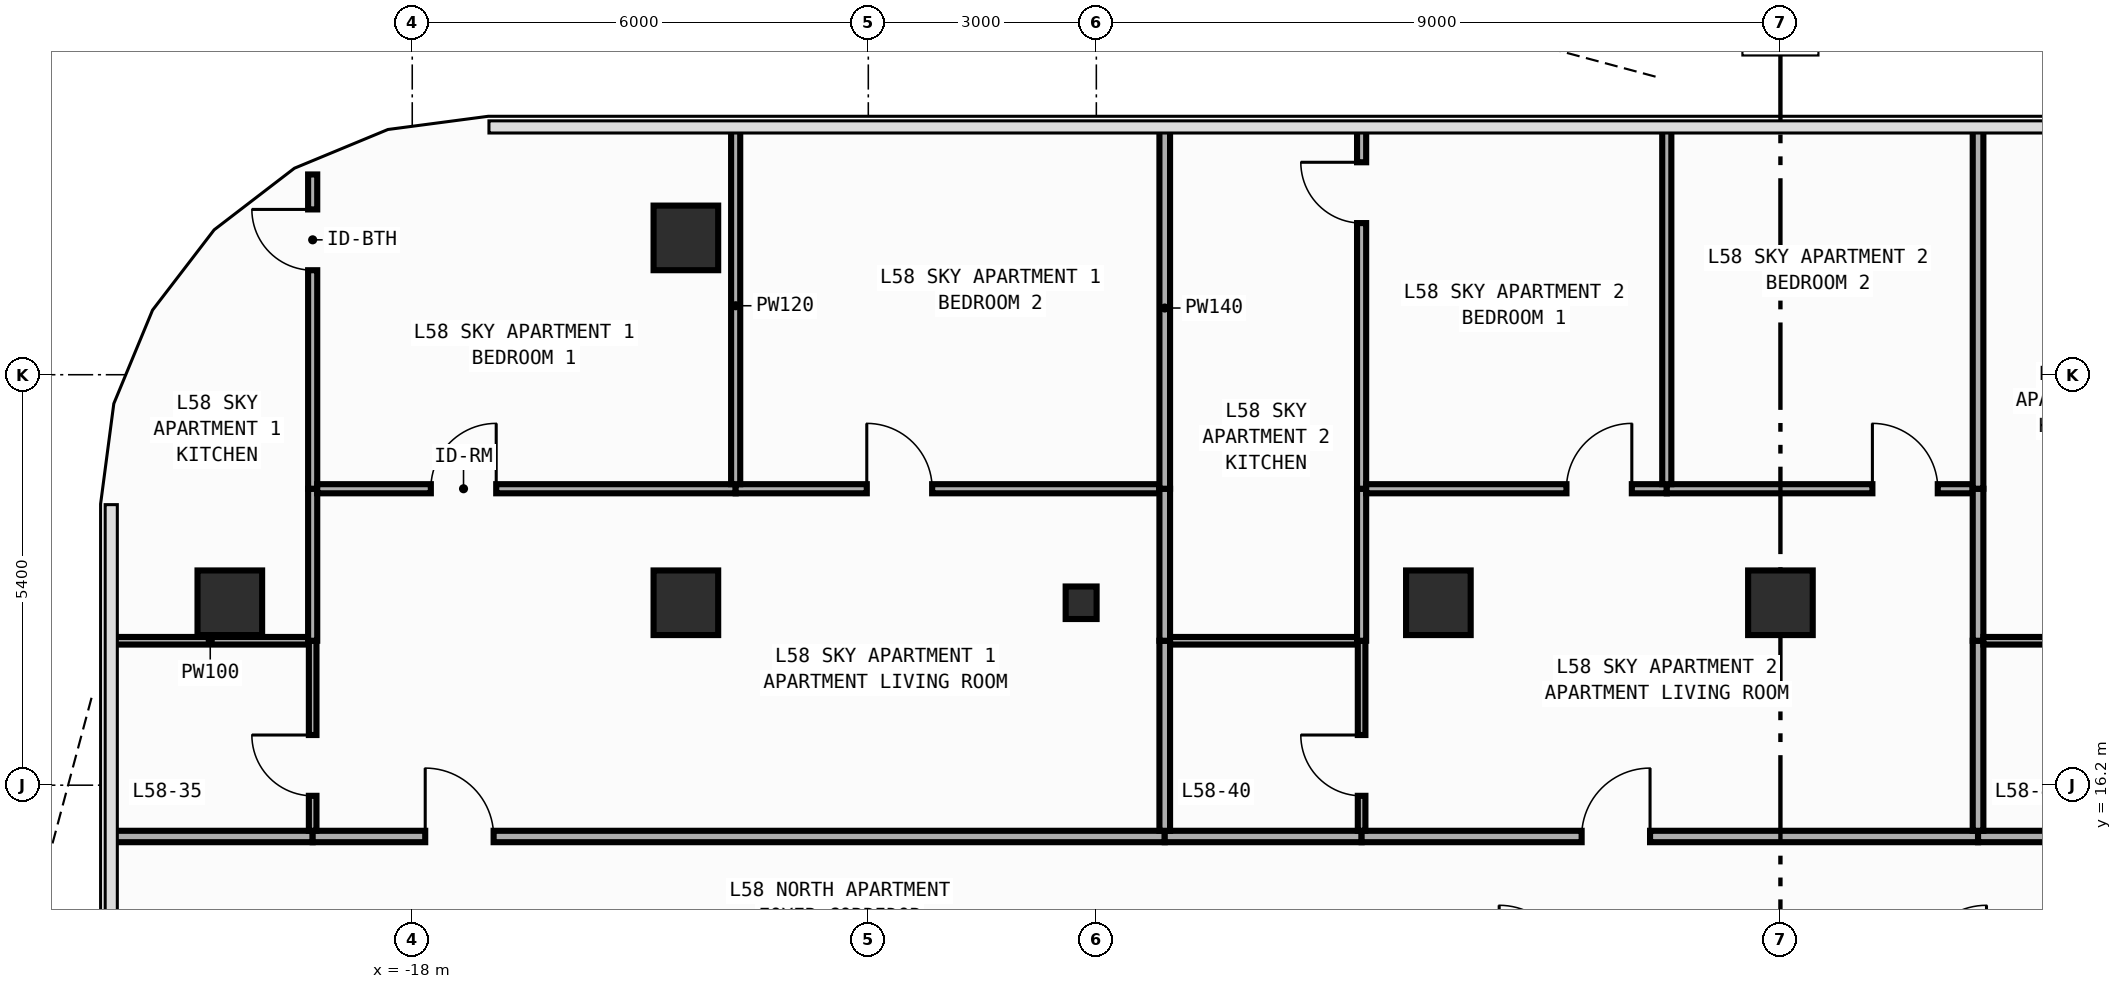
"""IFC4 building model, lengths in metres.
Left out: names, types, materials, properties, quantities, classifications, styles, units other than length and angle.
Written with IfcOpenShell. Run it as: python <this file> out.ifc"""

import sys

from ifc_helpers import new_model, si_unit, direction, frame, frame_2d, origin, origin_2d, place, context, subcontext, project, spatial, rectangle, i_section, extrude, element, fill, save


model = new_model("IFC4")
c1 = context("Model", 3, precision=1e-05, world=origin(), true_north=direction((0.0, 1.0)))
c2 = subcontext(c1, "Body", "Model", "MODEL_VIEW")
j1 = project(units=[si_unit("LENGTHUNIT", "METRE"), si_unit("PLANEANGLEUNIT", "RADIAN")], contexts=[c1])
p1 = place(None, origin())
s1 = spatial("IfcSite", under=j1, at=p1, CompositionType="ELEMENT")
p2 = place(p1, origin())
s2 = spatial("IfcBuilding", under=s1, at=p2, CompositionType="ELEMENT")
p3 = place(p2, frame((0.0, 0.0, 247.6)))
s3 = spatial("IfcBuildingStorey", under=s2, at=p3, CompositionType="ELEMENT", Elevation=247.6)
p4 = place(p3, frame((-9.2, 18.6, 0.0), z_axis=(0.0, 0.0, 1.0), x_axis=(1.0, 0.0, 0.0)))
e1 = element("IfcColumn", 1, at=p4, inside=s3, PredefinedType="COLUMN", context=c2, shape_type="SweptSolid", body=[
    extrude(i_section(OverallWidth=0.407, OverallDepth=0.428, WebThickness=0.02, FlangeThickness=0.035, FilletRadius=0.022, at=origin_2d()), origin(), (0.0, 0.0, 1.0), 3.6),
])
for number, where, z_axis, x_axis in (
    (2, (-20.4, 18.6, 0.0), (0.0, 0.0, 1.0), (1.0, 0.0, 0.0)),
    (3, (-14.4, 18.6, 0.0), (0.0, 0.0, 1.0), (1.0, 0.0, 0.0)),
    (4, (-4.5, 18.6, 0.0), (0.0, 0.0, 1.0), (1.0, 0.0, 0.0)),
    (5, (0.0, 18.6, 0.0), (0.0, 0.0, 1.0), (1.0, 0.0, 0.0)),
    (6, (-14.4, 23.4, 0.0), (0.0, 0.0, 1.0), (1.0, 0.0, 0.0)),
):
    element("IfcColumn", number, at=place(p3, frame(where, z_axis=z_axis, x_axis=x_axis)), inside=s3, PredefinedType="COLUMN", context=c2, shape_type="SweptSolid", body=[
        extrude(rectangle(XDim=0.85, YDim=0.85, at=origin_2d()), origin(), (0.0, 0.0, 1.0), 3.6),
    ])
p5 = place(p3, frame((-21.955, 15.525, 0.0), z_axis=(0.0, 0.0, 1.0), x_axis=(1.0, 0.0, 0.0)))
e7 = element("IfcWall", 7, at=p5, inside=s3, PredefinedType="PARTITIONING", context=c2, shape_type="SweptSolid", body=[
    extrude(rectangle(XDim=2.645, YDim=0.15, at=frame_2d((1.323, 0.0))), origin(), (0.0, 0.0, 1.0), 3.34),
])
p6 = place(p3, frame((-19.31, 15.525, 0.0), z_axis=(0.0, 0.0, 1.0), x_axis=(1.0, 0.0, 0.0)))
e8 = element("IfcWall", 8, at=p6, inside=s3, PredefinedType="PARTITIONING", context=c2, shape_type="SweptSolid", body=[
    extrude(rectangle(XDim=11.21, YDim=0.15, at=frame_2d((5.605, 0.0))), origin(), (0.0, 0.0, 1.0), 3.34),
])
p7 = place(p6, frame((1.481, 0.0, 0.0)))
e9 = element("IfcOpeningElement", 9, at=p7, cuts=e8, PredefinedType="OPENING", context=c2, shape_type="SweptSolid", body=[
    extrude(rectangle(XDim=0.9, YDim=2.15, at=frame_2d((0.45, 1.075))), frame((0.0, 0.085, 0.0), z_axis=(0.0, -1.0, 0.0), x_axis=(1.0, 0.0, 0.0)), (0.0, 0.0, 1.0), 0.17),
])
p8 = place(p3, frame((-8.1, 15.525, 0.0), z_axis=(0.0, 0.0, 1.0), x_axis=(1.0, 0.0, 0.0)))
e10 = element("IfcWall", 10, at=p8, inside=s3, PredefinedType="PARTITIONING", context=c2, shape_type="SweptSolid", body=[
    extrude(rectangle(XDim=2.59, YDim=0.15, at=frame_2d((1.295, 0.0))), origin(), (0.0, 0.0, 1.0), 3.34),
])
p9 = place(p3, frame((-5.51, 15.525, 0.0), z_axis=(0.0, 0.0, 1.0), x_axis=(1.0, 0.0, 0.0)))
e11 = element("IfcWall", 11, at=p9, inside=s3, PredefinedType="PARTITIONING", context=c2, shape_type="SweptSolid", body=[
    extrude(rectangle(XDim=8.11, YDim=0.15, at=frame_2d((4.055, 0.0))), origin(), (0.0, 0.0, 1.0), 3.34),
])
p10 = place(p9, frame((2.895, 0.0, 0.0)))
e12 = element("IfcOpeningElement", 12, at=p10, cuts=e11, PredefinedType="OPENING", context=c2, shape_type="SweptSolid", body=[
    extrude(rectangle(XDim=0.9, YDim=2.15, at=frame_2d((0.45, 1.075))), frame((0.0, 0.085, 0.0), z_axis=(0.0, -1.0, 0.0), x_axis=(1.0, 0.0, 0.0)), (0.0, 0.0, 1.0), 0.17),
])
p11 = place(p3, frame((2.6, 15.525, 0.0), z_axis=(0.0, 0.0, 1.0), x_axis=(1.0, 0.0, 0.0)))
e13 = element("IfcWall", 13, at=p11, inside=s3, PredefinedType="PARTITIONING", context=c2, shape_type="SweptSolid", body=[
    extrude(rectangle(XDim=2.59, YDim=0.15, at=frame_2d((1.295, 0.0))), origin(), (0.0, 0.0, 1.0), 3.34),
])
p12 = place(p3, frame((-21.955, 18.1, 0.0), z_axis=(0.0, 0.0, 1.0), x_axis=(1.0, 0.0, 0.0)))
e14 = element("IfcWall", 14, at=p12, inside=s3, PredefinedType="PARTITIONING", context=c2, shape_type="SweptSolid", body=[
    extrude(rectangle(XDim=2.595, YDim=0.1, at=frame_2d((1.297, 0.0))), origin(), (0.0, 0.0, 1.0), 3.34),
])
p13 = place(p3, frame((-19.31, 15.6, 0.0), z_axis=(0.0, 0.0, 1.0), x_axis=(0.0, 1.0, 0.0)))
e15 = element("IfcWall", 15, at=p13, inside=s3, PredefinedType="PARTITIONING", context=c2, shape_type="SweptSolid", body=[
    extrude(rectangle(XDim=2.5, YDim=0.1, at=frame_2d((1.25, 0.0))), origin(), (0.0, 0.0, 1.0), 3.34),
])
p14 = place(p13, frame((0.46, 0.0, 0.0)))
e16 = element("IfcOpeningElement", 16, at=p14, cuts=e15, PredefinedType="OPENING", context=c2, shape_type="SweptSolid", body=[
    extrude(rectangle(XDim=0.8, YDim=2.1, at=frame_2d((0.4, 1.05))), frame((0.0, 0.06, 0.0), z_axis=(0.0, -1.0, 0.0), x_axis=(1.0, 0.0, 0.0)), (0.0, 0.0, 1.0), 0.12),
])
p15 = place(p3, frame((-19.31, 18.1, 0.0), z_axis=(0.0, 0.0, 1.0), x_axis=(0.0, 1.0, 0.0)))
e17 = element("IfcWall", 17, at=p15, inside=s3, PredefinedType="PARTITIONING", context=c2, shape_type="SweptSolid", body=[
    extrude(rectangle(XDim=2.0, YDim=0.12, at=frame_2d((1.0, 0.0))), origin(), (0.0, 0.0, 1.0), 3.34),
])
p16 = place(p3, frame((-19.31, 20.1, 0.0), z_axis=(0.0, 0.0, 1.0), x_axis=(0.0, 1.0, 0.0)))
e18 = element("IfcWall", 18, at=p16, inside=s3, PredefinedType="PARTITIONING", context=c2, shape_type="SweptSolid", body=[
    extrude(rectangle(XDim=4.135, YDim=0.12, at=frame_2d((2.067, 0.0))), origin(), (0.0, 0.0, 1.0), 3.34),
])
p17 = place(p16, frame((2.875, 0.0, 0.0)))
e19 = element("IfcOpeningElement", 19, at=p17, cuts=e18, PredefinedType="OPENING", context=c2, shape_type="SweptSolid", body=[
    extrude(rectangle(XDim=0.8, YDim=2.1, at=frame_2d((0.4, 1.05))), frame((0.0, 0.07, 0.0), z_axis=(0.0, -1.0, 0.0), x_axis=(1.0, 0.0, 0.0)), (0.0, 0.0, 1.0), 0.14),
])
p18 = place(p3, frame((-19.25, 20.1, 0.0), z_axis=(0.0, 0.0, 1.0), x_axis=(1.0, 0.0, 0.0)))
e20 = element("IfcWall", 20, at=p18, inside=s3, PredefinedType="PARTITIONING", context=c2, shape_type="SweptSolid", body=[
    extrude(rectangle(XDim=5.505, YDim=0.12, at=frame_2d((2.752, 0.0))), origin(), (0.0, 0.0, 1.0), 3.34),
])
p19 = place(p18, frame((1.495, 0.0, 0.0)))
e21 = element("IfcOpeningElement", 21, at=p19, cuts=e20, PredefinedType="OPENING", context=c2, shape_type="SweptSolid", body=[
    extrude(rectangle(XDim=0.86, YDim=2.15, at=frame_2d((0.43, 1.075))), frame((0.0, 0.07, 0.0), z_axis=(0.0, -1.0, 0.0), x_axis=(1.0, 0.0, 0.0)), (0.0, 0.0, 1.0), 0.14),
])
p20 = place(p3, frame((-13.745, 20.1, 0.0), z_axis=(0.0, 0.0, 1.0), x_axis=(1.0, 0.0, 0.0)))
e22 = element("IfcWall", 22, at=p20, inside=s3, PredefinedType="PARTITIONING", context=c2, shape_type="SweptSolid", body=[
    extrude(rectangle(XDim=5.575, YDim=0.12, at=frame_2d((2.788, 0.0))), origin(), (0.0, 0.0, 1.0), 3.34),
])
p21 = place(p20, frame((1.725, 0.0, 0.0)))
e23 = element("IfcOpeningElement", 23, at=p21, cuts=e22, PredefinedType="OPENING", context=c2, shape_type="SweptSolid", body=[
    extrude(rectangle(XDim=0.86, YDim=2.15, at=frame_2d((0.43, 1.075))), frame((0.0, 0.07, 0.0), z_axis=(0.0, -1.0, 0.0), x_axis=(1.0, 0.0, 0.0)), (0.0, 0.0, 1.0), 0.14),
])
p22 = place(p3, frame((-8.1, 15.6, 0.0), z_axis=(0.0, 0.0, 1.0), x_axis=(0.0, 1.0, 0.0)))
e24 = element("IfcWall", 24, at=p22, inside=s3, PredefinedType="PARTITIONING", context=c2, shape_type="SweptSolid", body=[
    extrude(rectangle(XDim=2.5, YDim=0.14, at=frame_2d((1.25, 0.0))), origin(), (0.0, 0.0, 1.0), 3.34),
])
p23 = place(p3, frame((-8.1, 18.1, 0.0), z_axis=(0.0, 0.0, 1.0), x_axis=(0.0, 1.0, 0.0)))
e25 = element("IfcWall", 25, at=p23, inside=s3, PredefinedType="PARTITIONING", context=c2, shape_type="SweptSolid", body=[
    extrude(rectangle(XDim=2.0, YDim=0.14, at=frame_2d((1.0, 0.0))), origin(), (0.0, 0.0, 1.0), 3.34),
])
p24 = place(p3, frame((-13.745, 20.16, 0.0), z_axis=(0.0, 0.0, 1.0), x_axis=(0.0, 1.0, 0.0)))
e26 = element("IfcWall", 26, at=p24, inside=s3, PredefinedType="PARTITIONING", context=c2, shape_type="SweptSolid", body=[
    extrude(rectangle(XDim=4.695, YDim=0.12, at=frame_2d((2.348, 0.0))), origin(), (0.0, 0.0, 1.0), 3.34),
])
p25 = place(p3, frame((-8.1, 20.1, 0.0), z_axis=(0.0, 0.0, 1.0), x_axis=(0.0, 1.0, 0.0)))
e27 = element("IfcWall", 27, at=p25, inside=s3, PredefinedType="PARTITIONING", context=c2, shape_type="SweptSolid", body=[
    extrude(rectangle(XDim=4.755, YDim=0.14, at=frame_2d((2.377, 0.0))), origin(), (0.0, 0.0, 1.0), 3.34),
])
p26 = place(p3, frame((-8.03, 18.1, 0.0), z_axis=(0.0, 0.0, 1.0), x_axis=(1.0, 0.0, 0.0)))
e28 = element("IfcWall", 28, at=p26, inside=s3, PredefinedType="PARTITIONING", context=c2, shape_type="SweptSolid", body=[
    extrude(rectangle(XDim=2.47, YDim=0.1, at=frame_2d((1.235, 0.0))), origin(), (0.0, 0.0, 1.0), 3.34),
])
p27 = place(p3, frame((-5.51, 15.6, 0.0), z_axis=(0.0, 0.0, 1.0), x_axis=(0.0, 1.0, 0.0)))
e29 = element("IfcWall", 29, at=p27, inside=s3, PredefinedType="PARTITIONING", context=c2, shape_type="SweptSolid", body=[
    extrude(rectangle(XDim=2.5, YDim=0.1, at=frame_2d((1.25, 0.0))), origin(), (0.0, 0.0, 1.0), 3.34),
])
p28 = place(p27, frame((0.46, 0.0, 0.0)))
e30 = element("IfcOpeningElement", 30, at=p28, cuts=e29, PredefinedType="OPENING", context=c2, shape_type="SweptSolid", body=[
    extrude(rectangle(XDim=0.8, YDim=2.1, at=frame_2d((0.4, 1.05))), frame((0.0, 0.06, 0.0), z_axis=(0.0, -1.0, 0.0), x_axis=(1.0, 0.0, 0.0)), (0.0, 0.0, 1.0), 0.12),
])
p29 = place(p3, frame((-5.51, 18.1, 0.0), z_axis=(0.0, 0.0, 1.0), x_axis=(0.0, 1.0, 0.0)))
e31 = element("IfcWall", 31, at=p29, inside=s3, PredefinedType="PARTITIONING", context=c2, shape_type="SweptSolid", body=[
    extrude(rectangle(XDim=2.0, YDim=0.12, at=frame_2d((1.0, 0.0))), origin(), (0.0, 0.0, 1.0), 3.34),
])
p30 = place(p3, frame((-5.51, 20.1, 0.0), z_axis=(0.0, 0.0, 1.0), x_axis=(0.0, 1.0, 0.0)))
e32 = element("IfcWall", 32, at=p30, inside=s3, PredefinedType="PARTITIONING", context=c2, shape_type="SweptSolid", body=[
    extrude(rectangle(XDim=4.755, YDim=0.12, at=frame_2d((2.377, 0.0))), origin(), (0.0, 0.0, 1.0), 3.34),
])
p31 = place(p30, frame((3.495, 0.0, 0.0)))
e33 = element("IfcOpeningElement", 33, at=p31, cuts=e32, PredefinedType="OPENING", context=c2, shape_type="SweptSolid", body=[
    extrude(rectangle(XDim=0.8, YDim=2.1, at=frame_2d((0.4, 1.05))), frame((0.0, 0.07, 0.0), z_axis=(0.0, -1.0, 0.0), x_axis=(1.0, 0.0, 0.0)), (0.0, 0.0, 1.0), 0.14),
])
p32 = place(p3, frame((-5.45, 20.1, 0.0), z_axis=(0.0, 0.0, 1.0), x_axis=(1.0, 0.0, 0.0)))
e34 = element("IfcWall", 34, at=p32, inside=s3, PredefinedType="PARTITIONING", context=c2, shape_type="SweptSolid", body=[
    extrude(rectangle(XDim=3.955, YDim=0.12, at=frame_2d((1.978, 0.0))), origin(), (0.0, 0.0, 1.0), 3.34),
])
p33 = place(p32, frame((2.635, 0.0, 0.0)))
e35 = element("IfcOpeningElement", 35, at=p33, cuts=e34, PredefinedType="OPENING", context=c2, shape_type="SweptSolid", body=[
    extrude(rectangle(XDim=0.86, YDim=2.15, at=frame_2d((0.43, 1.075))), frame((0.0, 0.07, 0.0), z_axis=(0.0, -1.0, 0.0), x_axis=(1.0, 0.0, 0.0)), (0.0, 0.0, 1.0), 0.14),
])
p34 = place(p3, frame((-1.495, 20.1, 0.0), z_axis=(0.0, 0.0, 1.0), x_axis=(1.0, 0.0, 0.0)))
e36 = element("IfcWall", 36, at=p34, inside=s3, PredefinedType="PARTITIONING", context=c2, shape_type="SweptSolid", body=[
    extrude(rectangle(XDim=4.025, YDim=0.12, at=frame_2d((2.013, 0.0))), origin(), (0.0, 0.0, 1.0), 3.34),
])
p35 = place(p34, frame((2.705, 0.0, 0.0)))
e37 = element("IfcOpeningElement", 37, at=p35, cuts=e36, PredefinedType="OPENING", context=c2, shape_type="SweptSolid", body=[
    extrude(rectangle(XDim=0.86, YDim=2.15, at=frame_2d((0.43, 1.075))), frame((0.0, 0.07, 0.0), z_axis=(0.0, -1.0, 0.0), x_axis=(1.0, 0.0, 0.0)), (0.0, 0.0, 1.0), 0.14),
])
p36 = place(p3, frame((2.6, 15.6, 0.0), z_axis=(0.0, 0.0, 1.0), x_axis=(0.0, 1.0, 0.0)))
e38 = element("IfcWall", 38, at=p36, inside=s3, PredefinedType="PARTITIONING", context=c2, shape_type="SweptSolid", body=[
    extrude(rectangle(XDim=2.5, YDim=0.14, at=frame_2d((1.25, 0.0))), origin(), (0.0, 0.0, 1.0), 3.34),
])
p37 = place(p3, frame((2.6, 18.1, 0.0), z_axis=(0.0, 0.0, 1.0), x_axis=(0.0, 1.0, 0.0)))
e39 = element("IfcWall", 39, at=p37, inside=s3, PredefinedType="PARTITIONING", context=c2, shape_type="SweptSolid", body=[
    extrude(rectangle(XDim=2.0, YDim=0.14, at=frame_2d((1.0, 0.0))), origin(), (0.0, 0.0, 1.0), 3.34),
])
p38 = place(p3, frame((-1.495, 20.16, 0.0), z_axis=(0.0, 0.0, 1.0), x_axis=(0.0, 1.0, 0.0)))
e40 = element("IfcWall", 40, at=p38, inside=s3, PredefinedType="PARTITIONING", context=c2, shape_type="SweptSolid", body=[
    extrude(rectangle(XDim=4.695, YDim=0.12, at=frame_2d((2.348, 0.0))), origin(), (0.0, 0.0, 1.0), 3.34),
])
p39 = place(p3, frame((2.6, 20.1, 0.0), z_axis=(0.0, 0.0, 1.0), x_axis=(0.0, 1.0, 0.0)))
e41 = element("IfcWall", 41, at=p39, inside=s3, PredefinedType="PARTITIONING", context=c2, shape_type="SweptSolid", body=[
    extrude(rectangle(XDim=4.755, YDim=0.14, at=frame_2d((2.377, 0.0))), origin(), (0.0, 0.0, 1.0), 3.34),
])
p40 = place(p3, frame((2.67, 18.1, 0.0), z_axis=(0.0, 0.0, 1.0), x_axis=(1.0, 0.0, 0.0)))
e42 = element("IfcWall", 42, at=p40, inside=s3, PredefinedType="PARTITIONING", context=c2, shape_type="SweptSolid", body=[
    extrude(rectangle(XDim=2.47, YDim=0.1, at=frame_2d((1.235, 0.0))), origin(), (0.0, 0.0, 1.0), 3.34),
])
p41 = place(p7, origin())
e43 = element("IfcDoor", 43, at=p41, inside=s3, OperationType="SINGLE_SWING_LEFT", PredefinedType="DOOR", context=c2, shape_type="SweptSolid", body=[
    extrude(rectangle(XDim=0.9, YDim=2.15, at=frame_2d((0.45, 1.075))), frame((0.0, 0.025, 0.0), z_axis=(0.0, -1.0, 0.0), x_axis=(1.0, 0.0, 0.0)), (0.0, 0.0, 1.0), 0.05),
])
fill(e9, e43)
p42 = place(p10, origin())
e44 = element("IfcDoor", 44, at=p42, inside=s3, OperationType="SINGLE_SWING_RIGHT", PredefinedType="DOOR", context=c2, shape_type="SweptSolid", body=[
    extrude(rectangle(XDim=0.9, YDim=2.15, at=frame_2d((0.45, 1.075))), frame((0.0, 0.025, 0.0), z_axis=(0.0, -1.0, 0.0), x_axis=(1.0, 0.0, 0.0)), (0.0, 0.0, 1.0), 0.05),
])
fill(e12, e44)
p43 = place(p14, origin())
e45 = element("IfcDoor", 45, at=p43, inside=s3, OperationType="SINGLE_SWING_RIGHT", PredefinedType="DOOR", context=c2, shape_type="SweptSolid", body=[
    extrude(rectangle(XDim=0.8, YDim=2.1, at=frame_2d((0.4, 1.05))), frame((0.0, 0.025, 0.0), z_axis=(0.0, -1.0, 0.0), x_axis=(1.0, 0.0, 0.0)), (0.0, 0.0, 1.0), 0.05),
])
fill(e16, e45)
p44 = place(p19, origin())
e46 = element("IfcDoor", 46, at=p44, inside=s3, OperationType="SINGLE_SWING_RIGHT", PredefinedType="DOOR", context=c2, shape_type="SweptSolid", body=[
    extrude(rectangle(XDim=0.86, YDim=2.15, at=frame_2d((0.43, 1.075))), frame((0.0, 0.025, 0.0), z_axis=(0.0, -1.0, 0.0), x_axis=(1.0, 0.0, 0.0)), (0.0, 0.0, 1.0), 0.05),
])
fill(e21, e46)
p45 = place(p21, origin())
e47 = element("IfcDoor", 47, at=p45, inside=s3, OperationType="SINGLE_SWING_LEFT", PredefinedType="DOOR", context=c2, shape_type="SweptSolid", body=[
    extrude(rectangle(XDim=0.86, YDim=2.15, at=frame_2d((0.43, 1.075))), frame((0.0, 0.025, 0.0), z_axis=(0.0, -1.0, 0.0), x_axis=(1.0, 0.0, 0.0)), (0.0, 0.0, 1.0), 0.05),
])
fill(e23, e47)
p46 = place(p28, origin())
e48 = element("IfcDoor", 48, at=p46, inside=s3, OperationType="SINGLE_SWING_RIGHT", PredefinedType="DOOR", context=c2, shape_type="SweptSolid", body=[
    extrude(rectangle(XDim=0.8, YDim=2.1, at=frame_2d((0.4, 1.05))), frame((0.0, 0.025, 0.0), z_axis=(0.0, -1.0, 0.0), x_axis=(1.0, 0.0, 0.0)), (0.0, 0.0, 1.0), 0.05),
])
fill(e30, e48)
p47 = place(p33, origin())
e49 = element("IfcDoor", 49, at=p47, inside=s3, OperationType="SINGLE_SWING_RIGHT", PredefinedType="DOOR", context=c2, shape_type="SweptSolid", body=[
    extrude(rectangle(XDim=0.86, YDim=2.15, at=frame_2d((0.43, 1.075))), frame((0.0, 0.025, 0.0), z_axis=(0.0, -1.0, 0.0), x_axis=(1.0, 0.0, 0.0)), (0.0, 0.0, 1.0), 0.05),
])
fill(e35, e49)
p48 = place(p35, origin())
e50 = element("IfcDoor", 50, at=p48, inside=s3, OperationType="SINGLE_SWING_LEFT", PredefinedType="DOOR", context=c2, shape_type="SweptSolid", body=[
    extrude(rectangle(XDim=0.86, YDim=2.15, at=frame_2d((0.43, 1.075))), frame((0.0, 0.025, 0.0), z_axis=(0.0, -1.0, 0.0), x_axis=(1.0, 0.0, 0.0)), (0.0, 0.0, 1.0), 0.05),
])
fill(e37, e50)
p49 = place(p31, origin())
e51 = element("IfcDoor", 51, at=p49, inside=s3, OperationType="SINGLE_SWING_RIGHT", PredefinedType="DOOR", context=c2, shape_type="SweptSolid", body=[
    extrude(rectangle(XDim=0.8, YDim=2.1, at=frame_2d((0.4, 1.05))), frame((0.0, 0.025, 0.0), z_axis=(0.0, -1.0, 0.0), x_axis=(1.0, 0.0, 0.0)), (0.0, 0.0, 1.0), 0.05),
])
fill(e33, e51)
p50 = place(p17, origin())
e52 = element("IfcDoor", 52, at=p50, inside=s3, OperationType="SINGLE_SWING_RIGHT", PredefinedType="DOOR", context=c2, shape_type="SweptSolid", body=[
    extrude(rectangle(XDim=0.8, YDim=2.1, at=frame_2d((0.4, 1.05))), frame((0.0, 0.025, 0.0), z_axis=(0.0, -1.0, 0.0), x_axis=(1.0, 0.0, 0.0)), (0.0, 0.0, 1.0), 0.05),
])
fill(e19, e52)
save(model, sys.argv[1])
